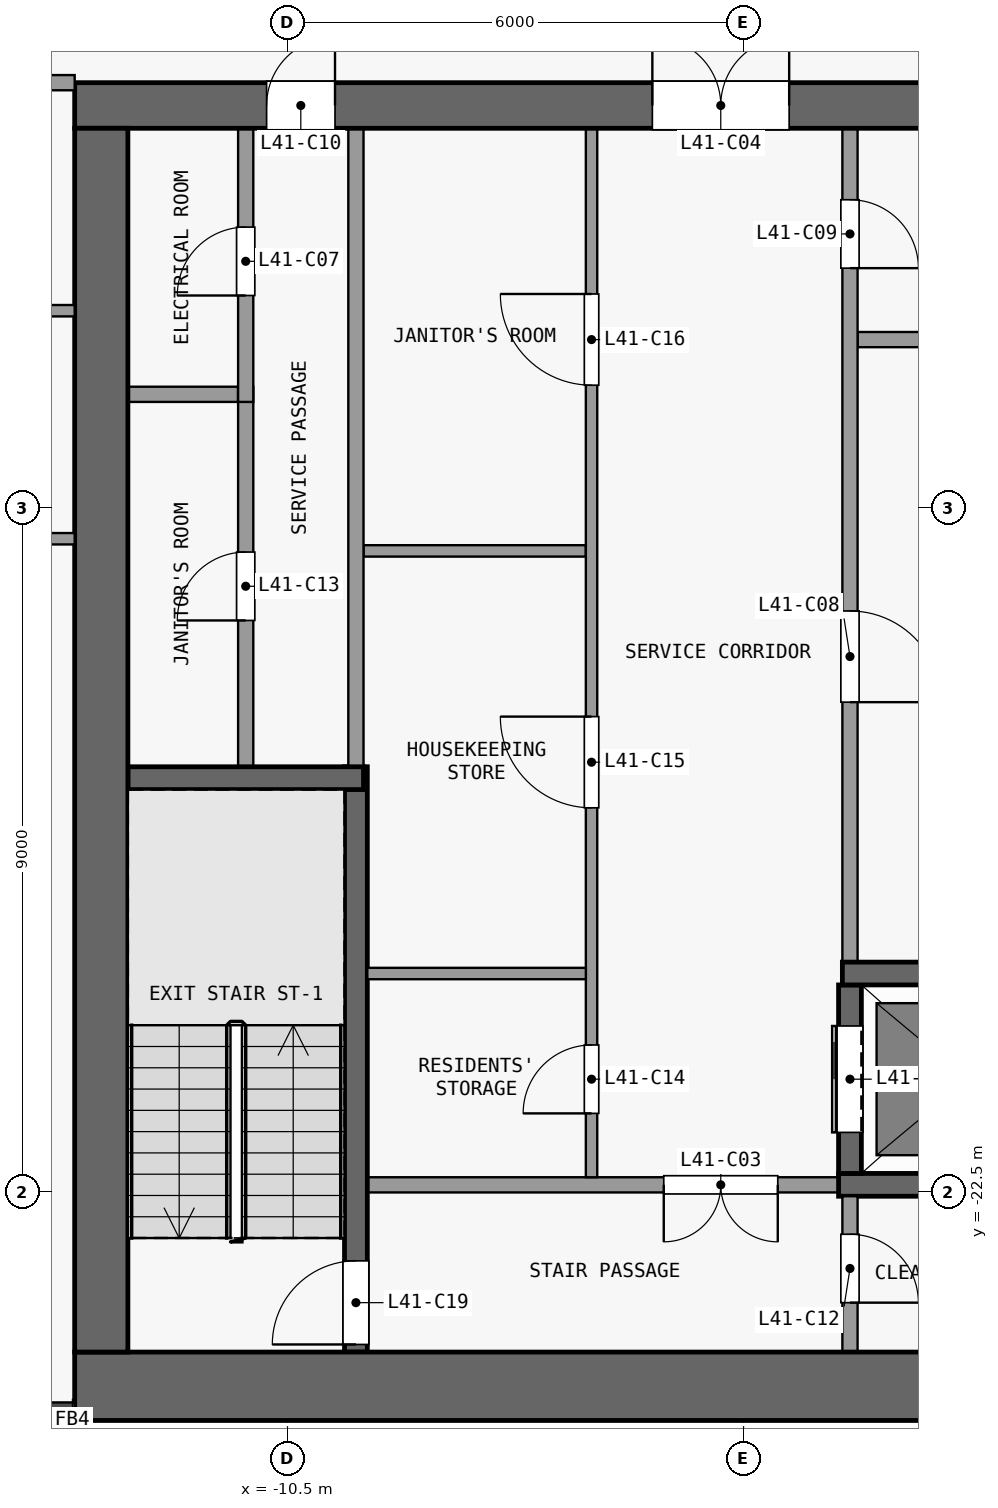
"""IFC4 building model, lengths in metres.
Left out: names, types, materials, properties, quantities, classifications, styles, units other than length and angle.
Written with IfcOpenShell. Run it as: python <this file> out.ifc"""

import sys

from ifc_helpers import new_model, si_unit, direction, frame, frame_2d, origin, place, context, subcontext, project, spatial, rectangle, extrude, element, fill, save


model = new_model("IFC4")
c1 = context("Model", 3, precision=1e-05, world=origin(), true_north=direction((0.0, 1.0)))
c2 = subcontext(c1, "Body", "Model", "MODEL_VIEW")
j1 = project(units=[si_unit("LENGTHUNIT", "METRE"), si_unit("PLANEANGLEUNIT", "RADIAN")], contexts=[c1])
p1 = place(None, origin())
s1 = spatial("IfcSite", under=j1, at=p1, CompositionType="ELEMENT")
p2 = place(p1, origin())
s2 = spatial("IfcBuilding", under=s1, at=p2, CompositionType="ELEMENT")
p3 = place(p2, frame((0.0, 0.0, 167.3)))
s3 = spatial("IfcBuildingStorey", under=s2, at=p3, CompositionType="ELEMENT", Elevation=167.3)
p4 = place(p3, frame((-13.3, -25.05, 0.0), z_axis=(0.0, 0.0, 1.0), x_axis=(1.0, 0.0, 0.0)))
e1 = element("IfcWall", 1, at=p4, inside=s3, PredefinedType="SHEAR", context=c2, shape_type="SweptSolid", body=[
    extrude(rectangle(XDim=26.6, YDim=0.9, at=frame_2d((13.3, 0.0))), origin(), (0.0, 0.0, 1.0), 3.3),
])
p5 = place(p3, frame((-13.3, -8.2, 0.0), z_axis=(0.0, 0.0, 1.0), x_axis=(1.0, 0.0, 0.0)))
e2 = element("IfcWall", 2, at=p5, inside=s3, PredefinedType="SHEAR", context=c2, shape_type="SweptSolid", body=[
    extrude(rectangle(XDim=26.6, YDim=0.6, at=frame_2d((13.3, 0.0))), origin(), (0.0, 0.0, 1.0), 3.3),
])
p6 = place(p5, frame((7.6, 0.0, 0.0)))
e3 = element("IfcOpeningElement", 3, at=p6, cuts=e2, PredefinedType="OPENING", context=c2, shape_type="SweptSolid", body=[
    extrude(rectangle(XDim=1.8, YDim=2.1, at=frame_2d((0.9, 1.05))), frame((0.0, 0.31, 0.0), z_axis=(0.0, -1.0, 0.0), x_axis=(1.0, 0.0, 0.0)), (0.0, 0.0, 1.0), 0.62),
])
p7 = place(p5, frame((17.2, 0.0, 0.0)))
e4 = element("IfcOpeningElement", 4, at=p7, cuts=e2, PredefinedType="OPENING", context=c2, shape_type="SweptSolid", body=[
    extrude(rectangle(XDim=1.8, YDim=2.1, at=frame_2d((0.9, 1.05))), frame((0.0, 0.31, 0.0), z_axis=(0.0, -1.0, 0.0), x_axis=(1.0, 0.0, 0.0)), (0.0, 0.0, 1.0), 0.62),
])
p8 = place(p5, frame((2.525, 0.0, 0.0)))
e5 = element("IfcOpeningElement", 5, at=p8, cuts=e2, PredefinedType="OPENING", context=c2, shape_type="SweptSolid", body=[
    extrude(rectangle(XDim=0.9, YDim=2.1, at=frame_2d((0.45, 1.05))), frame((0.0, 0.31, 0.0), z_axis=(0.0, -1.0, 0.0), x_axis=(1.0, 0.0, 0.0)), (0.0, 0.0, 1.0), 0.62),
])
p9 = place(p5, frame((23.875, 0.0, 0.0)))
e6 = element("IfcOpeningElement", 6, at=p9, cuts=e2, PredefinedType="OPENING", context=c2, shape_type="SweptSolid", body=[
    extrude(rectangle(XDim=1.2, YDim=2.1, at=frame_2d((0.6, 1.05))), frame((0.0, 0.31, 0.0), z_axis=(0.0, -1.0, 0.0), x_axis=(1.0, 0.0, 0.0)), (0.0, 0.0, 1.0), 0.62),
])
p10 = place(p3, frame((-12.95, -24.6, 0.0), z_axis=(0.0, 0.0, 1.0), x_axis=(0.0, 1.0, 0.0)))
e7 = element("IfcWall", 7, at=p10, inside=s3, PredefinedType="SHEAR", context=c2, shape_type="SweptSolid", body=[
    extrude(rectangle(XDim=16.1, YDim=0.7, at=frame_2d((8.05, 0.0))), origin(), (0.0, 0.0, 1.0), 3.3),
])
p11 = place(p3, frame((-3.25, -22.4, 0.0), z_axis=(0.0, 0.0, 1.0), x_axis=(-1.0, 0.0, 0.0)))
e8 = element("IfcWall", 8, at=p11, inside=s3, PredefinedType="PARTITIONING", context=c2, shape_type="SweptSolid", body=[
    extrude(rectangle(XDim=6.2, YDim=0.2, at=frame_2d((3.1, 0.0))), origin(), (0.0, 0.0, 1.0), 3.3),
])
p12 = place(p11, frame((0.8, 0.0, 0.0)))
e9 = element("IfcOpeningElement", 9, at=p12, cuts=e8, PredefinedType="OPENING", context=c2, shape_type="SweptSolid", body=[
    extrude(rectangle(XDim=1.5, YDim=2.1, at=frame_2d((0.75, 1.05))), frame((0.0, 0.11, 0.0), z_axis=(0.0, -1.0, 0.0), x_axis=(1.0, 0.0, 0.0)), (0.0, 0.0, 1.0), 0.22),
])
p13 = place(p3, frame((-3.25, -22.4, 0.0), z_axis=(0.0, 0.0, 1.0), x_axis=(1.0, 0.0, 0.0)))
e10 = element("IfcWall", 10, at=p13, inside=s3, PredefinedType="SHEAR", context=c2, shape_type="SweptSolid", body=[
    extrude(rectangle(XDim=6.2, YDim=0.3, at=frame_2d((3.1, 0.0))), origin(), (0.0, 0.0, 1.0), 3.3),
])
p14 = place(p3, frame((-9.45, -19.62, 0.0), z_axis=(0.0, 0.0, 1.0), x_axis=(1.0, 0.0, 0.0)))
e11 = element("IfcWall", 11, at=p14, inside=s3, PredefinedType="PARTITIONING", context=c2, shape_type="SweptSolid", body=[
    extrude(rectangle(XDim=2.875, YDim=0.15, at=frame_2d((1.438, 0.0))), origin(), (0.0, 0.0, 1.0), 3.3),
])
p15 = place(p3, frame((-3.2, -19.62, 0.0), z_axis=(0.0, 0.0, 1.0), x_axis=(1.0, 0.0, 0.0)))
e12 = element("IfcWall", 12, at=p15, inside=s3, PredefinedType="SHEAR", context=c2, shape_type="SweptSolid", body=[
    extrude(rectangle(XDim=3.05, YDim=0.3, at=frame_2d((1.525, 0.0))), origin(), (0.0, 0.0, 1.0), 3.3),
])
p16 = place(p3, frame((-12.6, -17.05, 0.0), z_axis=(0.0, 0.0, 1.0), x_axis=(1.0, 0.0, 0.0)))
e13 = element("IfcWall", 13, at=p16, inside=s3, PredefinedType="SHEAR", context=c2, shape_type="SweptSolid", body=[
    extrude(rectangle(XDim=3.1, YDim=0.3, at=frame_2d((1.55, 0.0))), origin(), (0.0, 0.0, 1.0), 3.3),
])
p17 = place(p3, frame((-9.5, -14.06, 0.0), z_axis=(0.0, 0.0, 1.0), x_axis=(1.0, 0.0, 0.0)))
e14 = element("IfcWall", 14, at=p17, inside=s3, PredefinedType="PARTITIONING", context=c2, shape_type="SweptSolid", body=[
    extrude(rectangle(XDim=2.925, YDim=0.15, at=frame_2d((1.462, 0.0))), origin(), (0.0, 0.0, 1.0), 3.3),
])
p18 = place(p3, frame((-12.6, -12.0, 0.0), z_axis=(0.0, 0.0, 1.0), x_axis=(1.0, 0.0, 0.0)))
e15 = element("IfcWall", 15, at=p18, inside=s3, PredefinedType="PARTITIONING", context=c2, shape_type="SweptSolid", body=[
    extrude(rectangle(XDim=1.45, YDim=0.2, at=frame_2d((0.725, 0.0))), origin(), (0.0, 0.0, 1.0), 3.3),
])
p19 = place(p3, frame((-3.0, -11.28, 0.0), z_axis=(0.0, 0.0, 1.0), x_axis=(1.0, 0.0, 0.0)))
e16 = element("IfcWall", 16, at=p19, inside=s3, PredefinedType="PARTITIONING", context=c2, shape_type="SweptSolid", body=[
    extrude(rectangle(XDim=2.85, YDim=0.2, at=frame_2d((1.425, 0.0))), origin(), (0.0, 0.0, 1.0), 3.3),
])
p20 = place(p3, frame((-11.05, -16.9, 0.0), z_axis=(0.0, 0.0, 1.0), x_axis=(0.0, 1.0, 0.0)))
e17 = element("IfcWall", 17, at=p20, inside=s3, PredefinedType="PARTITIONING", context=c2, shape_type="SweptSolid", body=[
    extrude(rectangle(XDim=5.0, YDim=0.2, at=frame_2d((2.5, 0.0))), origin(), (0.0, 0.0, 1.0), 3.3),
])
p21 = place(p20, frame((1.925, 0.0, 0.0)))
e18 = element("IfcOpeningElement", 18, at=p21, cuts=e17, PredefinedType="OPENING", context=c2, shape_type="SweptSolid", body=[
    extrude(rectangle(XDim=0.9, YDim=2.1, at=frame_2d((0.45, 1.05))), frame((0.0, 0.11, 0.0), z_axis=(0.0, -1.0, 0.0), x_axis=(1.0, 0.0, 0.0)), (0.0, 0.0, 1.0), 0.22),
])
p22 = place(p3, frame((-11.05, -12.1, 0.0), z_axis=(0.0, 0.0, 1.0), x_axis=(0.0, 1.0, 0.0)))
e19 = element("IfcWall", 19, at=p22, inside=s3, PredefinedType="PARTITIONING", context=c2, shape_type="SweptSolid", body=[
    extrude(rectangle(XDim=3.6, YDim=0.2, at=frame_2d((1.8, 0.0))), origin(), (0.0, 0.0, 1.0), 3.3),
])
p23 = place(p22, frame((1.4, 0.0, 0.0)))
e20 = element("IfcOpeningElement", 20, at=p23, cuts=e19, PredefinedType="OPENING", context=c2, shape_type="SweptSolid", body=[
    extrude(rectangle(XDim=0.9, YDim=2.1, at=frame_2d((0.45, 1.05))), frame((0.0, 0.11, 0.0), z_axis=(0.0, -1.0, 0.0), x_axis=(1.0, 0.0, 0.0)), (0.0, 0.0, 1.0), 0.22),
])
p24 = place(p3, frame((-9.6, -24.6, 0.0), z_axis=(0.0, 0.0, 1.0), x_axis=(0.0, 1.0, 0.0)))
e21 = element("IfcWall", 21, at=p24, inside=s3, PredefinedType="SHEAR", context=c2, shape_type="SweptSolid", body=[
    extrude(rectangle(XDim=7.7, YDim=0.3, at=frame_2d((3.85, 0.0))), origin(), (0.0, 0.0, 1.0), 3.3),
])
p25 = place(p24, frame((0.1, 0.0, 0.0)))
e22 = element("IfcOpeningElement", 22, at=p25, cuts=e21, PredefinedType="OPENING", context=c2, shape_type="SweptSolid", body=[
    extrude(rectangle(XDim=1.1, YDim=2.1, at=frame_2d((0.55, 1.05))), frame((0.0, 0.16, 0.0), z_axis=(0.0, -1.0, 0.0), x_axis=(1.0, 0.0, 0.0)), (0.0, 0.0, 1.0), 0.32),
])
p26 = place(p3, frame((-9.6, -16.9, 0.0), z_axis=(0.0, 0.0, 1.0), x_axis=(0.0, 1.0, 0.0)))
e23 = element("IfcWall", 23, at=p26, inside=s3, PredefinedType="PARTITIONING", context=c2, shape_type="SweptSolid", body=[
    extrude(rectangle(XDim=8.4, YDim=0.2, at=frame_2d((4.2, 0.0))), origin(), (0.0, 0.0, 1.0), 3.3),
])
p27 = place(p3, frame((-6.5, -22.3, 0.0), z_axis=(0.0, 0.0, 1.0), x_axis=(0.0, 1.0, 0.0)))
e24 = element("IfcWall", 24, at=p27, inside=s3, PredefinedType="PARTITIONING", context=c2, shape_type="SweptSolid", body=[
    extrude(rectangle(XDim=13.8, YDim=0.15, at=frame_2d((6.9, 0.0))), origin(), (0.0, 0.0, 1.0), 3.3),
])
p28 = place(p27, frame((0.84, 0.0, 0.0)))
e25 = element("IfcOpeningElement", 25, at=p28, cuts=e24, PredefinedType="OPENING", context=c2, shape_type="SweptSolid", body=[
    extrude(rectangle(XDim=0.9, YDim=2.1, at=frame_2d((0.45, 1.05))), frame((0.0, 0.085, 0.0), z_axis=(0.0, -1.0, 0.0), x_axis=(1.0, 0.0, 0.0)), (0.0, 0.0, 1.0), 0.17),
])
p29 = place(p27, frame((4.86, 0.0, 0.0)))
e26 = element("IfcOpeningElement", 26, at=p29, cuts=e24, PredefinedType="OPENING", context=c2, shape_type="SweptSolid", body=[
    extrude(rectangle(XDim=1.2, YDim=2.1, at=frame_2d((0.6, 1.05))), frame((0.0, 0.085, 0.0), z_axis=(0.0, -1.0, 0.0), x_axis=(1.0, 0.0, 0.0)), (0.0, 0.0, 1.0), 0.17),
])
p30 = place(p27, frame((10.42, 0.0, 0.0)))
e27 = element("IfcOpeningElement", 27, at=p30, cuts=e24, PredefinedType="OPENING", context=c2, shape_type="SweptSolid", body=[
    extrude(rectangle(XDim=1.2, YDim=2.1, at=frame_2d((0.6, 1.05))), frame((0.0, 0.085, 0.0), z_axis=(0.0, -1.0, 0.0), x_axis=(1.0, 0.0, 0.0)), (0.0, 0.0, 1.0), 0.17),
])
p31 = place(p3, frame((-3.1, -22.55, 0.0), z_axis=(0.0, 0.0, 1.0), x_axis=(0.0, -1.0, 0.0)))
e28 = element("IfcWall", 28, at=p31, inside=s3, PredefinedType="PARTITIONING", context=c2, shape_type="SweptSolid", body=[
    extrude(rectangle(XDim=2.05, YDim=0.2, at=frame_2d((1.025, 0.0))), origin(), (0.0, 0.0, 1.0), 3.3),
])
p32 = place(p31, frame((0.5, 0.0, 0.0)))
e29 = element("IfcOpeningElement", 29, at=p32, cuts=e28, PredefinedType="OPENING", context=c2, shape_type="SweptSolid", body=[
    extrude(rectangle(XDim=0.9, YDim=2.1, at=frame_2d((0.45, 1.05))), frame((0.0, 0.11, 0.0), z_axis=(0.0, -1.0, 0.0), x_axis=(1.0, 0.0, 0.0)), (0.0, 0.0, 1.0), 0.22),
])
p33 = place(p3, frame((-3.1, -22.25, 0.0), z_axis=(0.0, 0.0, 1.0), x_axis=(0.0, 1.0, 0.0)))
e30 = element("IfcWall", 30, at=p33, inside=s3, PredefinedType="SHEAR", context=c2, shape_type="SweptSolid", body=[
    extrude(rectangle(XDim=2.48, YDim=0.3, at=frame_2d((1.24, 0.0))), origin(), (0.0, 0.0, 1.0), 3.3),
])
p34 = place(p33, frame((0.54, 0.0, 0.0)))
e31 = element("IfcOpeningElement", 31, at=p34, cuts=e30, PredefinedType="OPENING", context=c2, shape_type="SweptSolid", body=[
    extrude(rectangle(XDim=1.4, YDim=2.1, at=frame_2d((0.7, 1.05))), frame((0.0, 0.16, 0.0), z_axis=(0.0, -1.0, 0.0), x_axis=(1.0, 0.0, 0.0)), (0.0, 0.0, 1.0), 0.32),
])
p35 = place(p3, frame((-3.1, -8.5, 0.0), z_axis=(0.0, 0.0, 1.0), x_axis=(0.0, -1.0, 0.0)))
e32 = element("IfcWall", 32, at=p35, inside=s3, PredefinedType="PARTITIONING", context=c2, shape_type="SweptSolid", body=[
    extrude(rectangle(XDim=10.97, YDim=0.2, at=frame_2d((5.485, 0.0))), origin(), (0.0, 0.0, 1.0), 3.3),
])
p36 = place(p35, frame((6.35, 0.0, 0.0)))
e33 = element("IfcOpeningElement", 33, at=p36, cuts=e32, PredefinedType="OPENING", context=c2, shape_type="SweptSolid", body=[
    extrude(rectangle(XDim=1.2, YDim=2.1, at=frame_2d((0.6, 1.05))), frame((0.0, 0.11, 0.0), z_axis=(0.0, -1.0, 0.0), x_axis=(1.0, 0.0, 0.0)), (0.0, 0.0, 1.0), 0.22),
])
p37 = place(p35, frame((0.94, 0.0, 0.0)))
e34 = element("IfcOpeningElement", 34, at=p37, cuts=e32, PredefinedType="OPENING", context=c2, shape_type="SweptSolid", body=[
    extrude(rectangle(XDim=0.9, YDim=2.1, at=frame_2d((0.45, 1.05))), frame((0.0, 0.11, 0.0), z_axis=(0.0, -1.0, 0.0), x_axis=(1.0, 0.0, 0.0)), (0.0, 0.0, 1.0), 0.22),
])
p38 = place(p3, frame((-19.262, -13.9, 0.0), z_axis=(0.0, 0.0, 1.0), x_axis=(1.0, 0.0, 0.0)))
e35 = element("IfcWall", 35, at=p38, inside=s3, PredefinedType="PARTITIONING", context=c2, shape_type="SweptSolid", body=[
    extrude(rectangle(XDim=5.962, YDim=0.15, at=frame_2d((2.981, 0.0))), origin(), (0.0, 0.0, 1.0), 3.3),
])
p39 = place(p38, frame((0.512, 0.0, 0.0)))
e36 = element("IfcOpeningElement", 36, at=p39, cuts=e35, PredefinedType="OPENING", context=c2, shape_type="SweptSolid", body=[
    extrude(rectangle(XDim=0.9, YDim=2.1, at=frame_2d((0.45, 1.05))), frame((0.0, 0.085, 0.0), z_axis=(0.0, -1.0, 0.0), x_axis=(1.0, 0.0, 0.0)), (0.0, 0.0, 1.0), 0.17),
])
p40 = place(p3, frame((-19.262, -10.9, 0.0), z_axis=(0.0, 0.0, 1.0), x_axis=(1.0, 0.0, 0.0)))
e37 = element("IfcWall", 37, at=p40, inside=s3, PredefinedType="PARTITIONING", context=c2, shape_type="SweptSolid", body=[
    extrude(rectangle(XDim=5.962, YDim=0.15, at=frame_2d((2.981, 0.0))), origin(), (0.0, 0.0, 1.0), 3.3),
])
p41 = place(p40, frame((1.012, 0.0, 0.0)))
e38 = element("IfcOpeningElement", 38, at=p41, cuts=e37, PredefinedType="OPENING", context=c2, shape_type="SweptSolid", body=[
    extrude(rectangle(XDim=0.9, YDim=2.1, at=frame_2d((0.45, 1.05))), frame((0.0, 0.085, 0.0), z_axis=(0.0, -1.0, 0.0), x_axis=(1.0, 0.0, 0.0)), (0.0, 0.0, 1.0), 0.17),
])
p42 = place(p40, frame((3.963, 0.0, 0.0)))
e39 = element("IfcOpeningElement", 39, at=p42, cuts=e37, PredefinedType="OPENING", context=c2, shape_type="SweptSolid", body=[
    extrude(rectangle(XDim=0.9, YDim=2.1, at=frame_2d((0.45, 1.05))), frame((0.0, 0.085, 0.0), z_axis=(0.0, -1.0, 0.0), x_axis=(1.0, 0.0, 0.0)), (0.0, 0.0, 1.0), 0.17),
])
p43 = place(p3, frame((-19.262, -7.9, 0.0), z_axis=(0.0, 0.0, 1.0), x_axis=(1.0, 0.0, 0.0)))
e40 = element("IfcWall", 40, at=p43, inside=s3, PredefinedType="PARTITIONING", context=c2, shape_type="SweptSolid", body=[
    extrude(rectangle(XDim=5.962, YDim=0.2, at=frame_2d((2.981, 0.0))), origin(), (0.0, 0.0, 1.0), 3.3),
])
p44 = place(p43, frame((2.412, 0.0, 0.0)))
e41 = element("IfcOpeningElement", 41, at=p44, cuts=e40, PredefinedType="OPENING", context=c2, shape_type="SweptSolid", body=[
    extrude(rectangle(XDim=1.0, YDim=2.1, at=frame_2d((0.5, 1.05))), frame((0.0, 0.11, 0.0), z_axis=(0.0, -1.0, 0.0), x_axis=(1.0, 0.0, 0.0)), (0.0, 0.0, 1.0), 0.22),
])
p45 = place(p34, origin())
e42 = element("IfcDoor", 42, at=p45, inside=s3, OperationType="DOUBLE_DOOR_SLIDING", PredefinedType="DOOR", context=c2, shape_type="SweptSolid", body=[
    extrude(rectangle(XDim=1.4, YDim=2.1, at=frame_2d((0.7, 1.05))), frame((0.0, 0.025, 0.0), z_axis=(0.0, -1.0, 0.0), x_axis=(1.0, 0.0, 0.0)), (0.0, 0.0, 1.0), 0.05),
])
fill(e31, e42)
p46 = place(p12, origin())
e43 = element("IfcDoor", 43, at=p46, inside=s3, OperationType="DOUBLE_DOOR_SINGLE_SWING", PredefinedType="DOOR", context=c2, shape_type="SweptSolid", body=[
    extrude(rectangle(XDim=1.5, YDim=2.1, at=frame_2d((0.75, 1.05))), frame((0.0, 0.025, 0.0), z_axis=(0.0, -1.0, 0.0), x_axis=(1.0, 0.0, 0.0)), (0.0, 0.0, 1.0), 0.05),
])
fill(e9, e43)
p47 = place(p6, origin())
e44 = element("IfcDoor", 44, at=p47, inside=s3, OperationType="DOUBLE_DOOR_SINGLE_SWING", PredefinedType="DOOR", context=c2, shape_type="SweptSolid", body=[
    extrude(rectangle(XDim=1.8, YDim=2.1, at=frame_2d((0.9, 1.05))), frame((0.0, 0.025, 0.0), z_axis=(0.0, -1.0, 0.0), x_axis=(1.0, 0.0, 0.0)), (0.0, 0.0, 1.0), 0.05),
])
fill(e3, e44)
p48 = place(p23, origin())
e45 = element("IfcDoor", 45, at=p48, inside=s3, OperationType="SINGLE_SWING_LEFT", PredefinedType="DOOR", context=c2, shape_type="SweptSolid", body=[
    extrude(rectangle(XDim=0.9, YDim=2.1, at=frame_2d((0.45, 1.05))), frame((0.0, 0.025, 0.0), z_axis=(0.0, -1.0, 0.0), x_axis=(1.0, 0.0, 0.0)), (0.0, 0.0, 1.0), 0.05),
])
fill(e20, e45)
p49 = place(p36, origin())
e46 = element("IfcDoor", 46, at=p49, inside=s3, OperationType="SINGLE_SWING_RIGHT", PredefinedType="DOOR", context=c2, shape_type="SweptSolid", body=[
    extrude(rectangle(XDim=1.2, YDim=2.1, at=frame_2d((0.6, 1.05))), frame((0.0, 0.025, 0.0), z_axis=(0.0, -1.0, 0.0), x_axis=(1.0, 0.0, 0.0)), (0.0, 0.0, 1.0), 0.05),
])
fill(e33, e46)
p50 = place(p37, origin())
e47 = element("IfcDoor", 47, at=p50, inside=s3, OperationType="SINGLE_SWING_RIGHT", PredefinedType="DOOR", context=c2, shape_type="SweptSolid", body=[
    extrude(rectangle(XDim=0.9, YDim=2.1, at=frame_2d((0.45, 1.05))), frame((0.0, 0.025, 0.0), z_axis=(0.0, -1.0, 0.0), x_axis=(1.0, 0.0, 0.0)), (0.0, 0.0, 1.0), 0.05),
])
fill(e34, e47)
p51 = place(p8, origin())
e48 = element("IfcDoor", 48, at=p51, inside=s3, OperationType="SINGLE_SWING_RIGHT", PredefinedType="DOOR", context=c2, shape_type="SweptSolid", body=[
    extrude(rectangle(XDim=0.9, YDim=2.1, at=frame_2d((0.45, 1.05))), frame((0.0, 0.025, 0.0), z_axis=(0.0, -1.0, 0.0), x_axis=(1.0, 0.0, 0.0)), (0.0, 0.0, 1.0), 0.05),
])
fill(e5, e48)
p52 = place(p32, origin())
e49 = element("IfcDoor", 49, at=p52, inside=s3, OperationType="SINGLE_SWING_RIGHT", PredefinedType="DOOR", context=c2, shape_type="SweptSolid", body=[
    extrude(rectangle(XDim=0.9, YDim=2.1, at=frame_2d((0.45, 1.05))), frame((0.0, 0.025, 0.0), z_axis=(0.0, -1.0, 0.0), x_axis=(1.0, 0.0, 0.0)), (0.0, 0.0, 1.0), 0.05),
])
fill(e29, e49)
p53 = place(p21, origin())
e50 = element("IfcDoor", 50, at=p53, inside=s3, OperationType="SINGLE_SWING_LEFT", PredefinedType="DOOR", context=c2, shape_type="SweptSolid", body=[
    extrude(rectangle(XDim=0.9, YDim=2.1, at=frame_2d((0.45, 1.05))), frame((0.0, 0.025, 0.0), z_axis=(0.0, -1.0, 0.0), x_axis=(1.0, 0.0, 0.0)), (0.0, 0.0, 1.0), 0.05),
])
fill(e18, e50)
p54 = place(p28, origin())
e51 = element("IfcDoor", 51, at=p54, inside=s3, OperationType="SINGLE_SWING_LEFT", PredefinedType="DOOR", context=c2, shape_type="SweptSolid", body=[
    extrude(rectangle(XDim=0.9, YDim=2.1, at=frame_2d((0.45, 1.05))), frame((0.0, 0.025, 0.0), z_axis=(0.0, -1.0, 0.0), x_axis=(1.0, 0.0, 0.0)), (0.0, 0.0, 1.0), 0.05),
])
fill(e25, e51)
p55 = place(p29, origin())
e52 = element("IfcDoor", 52, at=p55, inside=s3, OperationType="SINGLE_SWING_RIGHT", PredefinedType="DOOR", context=c2, shape_type="SweptSolid", body=[
    extrude(rectangle(XDim=1.2, YDim=2.1, at=frame_2d((0.6, 1.05))), frame((0.0, 0.025, 0.0), z_axis=(0.0, -1.0, 0.0), x_axis=(1.0, 0.0, 0.0)), (0.0, 0.0, 1.0), 0.05),
])
fill(e26, e52)
p56 = place(p30, origin())
e53 = element("IfcDoor", 53, at=p56, inside=s3, OperationType="SINGLE_SWING_RIGHT", PredefinedType="DOOR", context=c2, shape_type="SweptSolid", body=[
    extrude(rectangle(XDim=1.2, YDim=2.1, at=frame_2d((0.6, 1.05))), frame((0.0, 0.025, 0.0), z_axis=(0.0, -1.0, 0.0), x_axis=(1.0, 0.0, 0.0)), (0.0, 0.0, 1.0), 0.05),
])
fill(e27, e53)
p57 = place(p25, origin())
e54 = element("IfcDoor", 54, at=p57, inside=s3, OperationType="SINGLE_SWING_LEFT", PredefinedType="DOOR", context=c2, shape_type="SweptSolid", body=[
    extrude(rectangle(XDim=1.1, YDim=2.1, at=frame_2d((0.55, 1.05))), frame((0.0, 0.025, 0.0), z_axis=(0.0, -1.0, 0.0), x_axis=(1.0, 0.0, 0.0)), (0.0, 0.0, 1.0), 0.05),
])
fill(e22, e54)
save(model, sys.argv[1])
